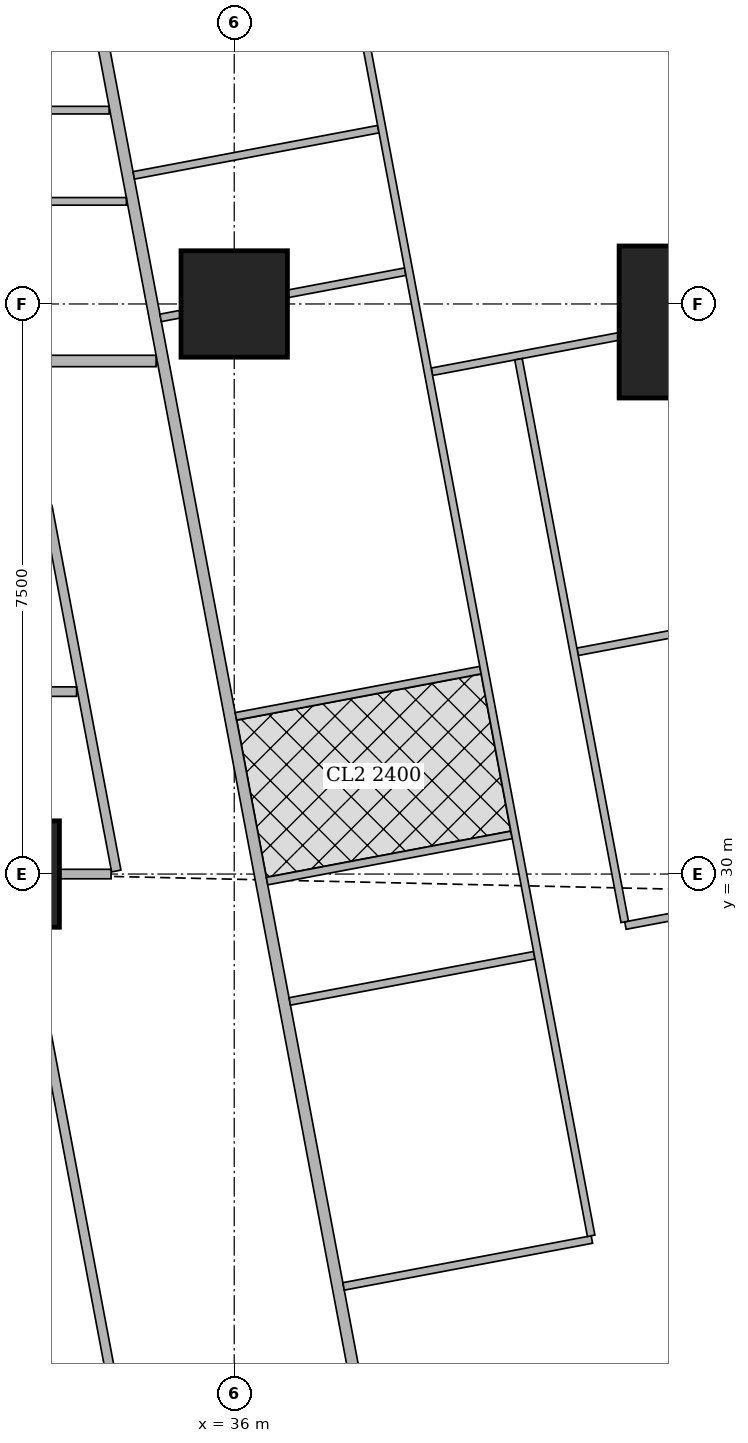
"""IFC4 building model, lengths in metres.
Left out: names, types, materials, properties, quantities, classifications, styles, units other than length and angle.
Written with IfcOpenShell. Run it as: python <this file> out.ifc"""

import sys

from ifc_helpers import new_model, si_unit, direction, frame, frame_2d, origin, origin_2d, place, context, subcontext, project, spatial, rectangle, extrude, element, fill, save


model = new_model("IFC4")
c1 = context("Model", 3, precision=1e-05, world=origin(), true_north=direction((0.0, 1.0)))
c2 = subcontext(c1, "Body", "Model", "MODEL_VIEW")
j1 = project(units=[si_unit("LENGTHUNIT", "METRE"), si_unit("PLANEANGLEUNIT", "RADIAN")], contexts=[c1])
p1 = place(None, origin())
s1 = spatial("IfcSite", under=j1, at=p1, CompositionType="ELEMENT")
p2 = place(p1, origin())
s2 = spatial("IfcBuilding", under=s1, at=p2, CompositionType="ELEMENT")
p3 = place(p2, frame((0.0, 0.0, 285.35)))
s3 = spatial("IfcBuildingStorey", under=s2, at=p3, CompositionType="ELEMENT", Elevation=285.35)
for number, where, z_axis, x_axis in (
    (1, (33.0, 30.0, 0.0), (0.0, 0.0, 1.0), (1.0, 0.0, 0.0)),
    (2, (36.0, 37.5, 0.0), (0.0, 0.0, 1.0), (1.0, 0.0, 0.0)),
):
    element("IfcColumn", number, at=place(p3, frame(where, z_axis=z_axis, x_axis=x_axis)), inside=s3, PredefinedType="COLUMN", context=c2, shape_type="SweptSolid", body=[
        extrude(rectangle(XDim=1.4, YDim=1.4, at=origin_2d()), origin(), (0.0, 0.0, 1.0), 3.75),
    ])
p4 = place(p3, frame((42.064, 37.263, 0.0), z_axis=(0.0, 0.0, 1.0), x_axis=(1.0, 0.0, 0.0)))
e3 = element("IfcColumn", 3, at=p4, inside=s3, PredefinedType="COLUMN", context=c2, shape_type="SweptSolid", body=[
    extrude(rectangle(XDim=2.0, YDim=2.0, at=origin_2d()), origin(), (0.0, 0.0, 1.0), 3.75),
])
p5 = place(p3, frame((29.501, 36.75, 0.0), z_axis=(0.0, 0.0, 1.0), x_axis=(1.0, 0.0, 0.0)))
e4 = element("IfcWall", 4, at=p5, inside=s3, PredefinedType="SOLIDWALL", context=c2, shape_type="SweptSolid", body=[
    extrude(rectangle(XDim=5.471, YDim=0.15, at=frame_2d((2.735, 0.0))), origin(), (0.0, 0.0, 1.0), 3.5),
])
p6 = place(p3, frame((34.036, 42.186, 0.0), z_axis=(0.0, 0.0, 1.0), x_axis=(0.185593518645, -0.9826266055, 0.0)))
e5 = element("IfcWall", 5, at=p6, inside=s3, PredefinedType="SOLIDWALL", context=c2, shape_type="SweptSolid", body=[
    extrude(rectangle(XDim=35.961, YDim=0.15, at=frame_2d((17.98, 0.0))), origin(), (0.0, 0.0, 1.0), 2.5),
])
p7 = place(p6, frame((19.345, 0.0, 0.0)))
e6 = element("IfcOpeningElement", 6, at=p7, cuts=e5, PredefinedType="OPENING", context=c2, shape_type="SweptSolid", body=[
    extrude(rectangle(XDim=1.0, YDim=2.1, at=frame_2d((0.5, 1.05))), frame((0.0, 0.085, 0.0), z_axis=(0.0, -1.0, 0.0), x_axis=(1.0, 0.0, 0.0)), (0.0, 0.0, 1.0), 0.17),
])
p8 = place(p6, frame((33.774, 0.0, 0.0)))
e7 = element("IfcOpeningElement", 7, at=p8, cuts=e5, PredefinedType="OPENING", context=c2, shape_type="SweptSolid", body=[
    extrude(rectangle(XDim=1.0, YDim=2.1, at=frame_2d((0.5, 1.05))), frame((0.0, 0.085, 0.0), z_axis=(0.0, -1.0, 0.0), x_axis=(1.0, 0.0, 0.0)), (0.0, 0.0, 1.0), 0.17),
])
p9 = place(p3, frame((41.054, 37.072, 0.0), z_axis=(0.0, 0.0, 1.0), x_axis=(-0.982579896219, -0.185840650951, 0.0)))
e8 = element("IfcWall", 8, at=p9, inside=s3, PredefinedType="PARTITIONING", context=c2, shape_type="SweptSolid", body=[
    extrude(rectangle(XDim=2.497, YDim=0.1, at=frame_2d((1.249, 0.0))), origin(), (0.0, 0.0, 1.0), 3.5),
])
p10 = place(p9, frame((1.447, 0.0, 0.0)))
e9 = element("IfcOpeningElement", 9, at=p10, cuts=e8, PredefinedType="OPENING", context=c2, shape_type="SweptSolid", body=[
    extrude(rectangle(XDim=0.9, YDim=2.1, at=frame_2d((0.45, 1.05))), frame((0.0, 0.06, 0.0), z_axis=(0.0, -1.0, 0.0), x_axis=(1.0, 0.0, 0.0)), (0.0, 0.0, 1.0), 0.12),
])
p11 = place(p3, frame((44.693, 33.713, 0.0), z_axis=(0.0, 0.0, 1.0), x_axis=(-0.982623519589, -0.185609856287, 0.0)))
e10 = element("IfcWall", 10, at=p11, inside=s3, PredefinedType="PARTITIONING", context=c2, shape_type="SweptSolid", body=[
    extrude(rectangle(XDim=4.25, YDim=0.1, at=frame_2d((2.125, 0.0))), origin(), (0.0, 0.0, 1.0), 2.5),
])
p12 = place(p3, frame((42.47, 29.572, 0.0), z_axis=(0.0, 0.0, 1.0), x_axis=(-0.982610503289, -0.185678751683, 0.0)))
e11 = element("IfcWall", 11, at=p12, inside=s3, PredefinedType="PARTITIONING", context=c2, shape_type="SweptSolid", body=[
    extrude(rectangle(XDim=1.346, YDim=0.1, at=frame_2d((0.673, 0.0))), origin(), (0.0, 0.0, 1.0), 2.5),
])
p13 = place(p3, frame((37.896, 39.8, 0.0), z_axis=(0.0, 0.0, 1.0), x_axis=(-0.982607026909, -0.185697147715, 0.0)))
e12 = element("IfcWall", 12, at=p13, inside=s3, PredefinedType="PARTITIONING", context=c2, shape_type="SweptSolid", body=[
    extrude(rectangle(XDim=3.275, YDim=0.1, at=frame_2d((1.637, 0.0))), origin(), (0.0, 0.0, 1.0), 3.5),
])
p14 = place(p3, frame((38.25, 37.925, 0.0), z_axis=(0.0, 0.0, 1.0), x_axis=(-0.982610209589, -0.185680305934, 0.0)))
e13 = element("IfcWall", 13, at=p14, inside=s3, PredefinedType="PARTITIONING", context=c2, shape_type="SweptSolid", body=[
    extrude(rectangle(XDim=1.567, YDim=0.1, at=frame_2d((0.784, 0.0))), origin(), (0.0, 0.0, 1.0), 3.5),
])
p15 = place(p3, frame((35.29, 37.366, 0.0), z_axis=(0.0, 0.0, 1.0), x_axis=(-0.982395465615, -0.18681313963, 0.0)))
e14 = element("IfcWall", 14, at=p15, inside=s3, PredefinedType="PARTITIONING", context=c2, shape_type="SweptSolid", body=[
    extrude(rectangle(XDim=0.263, YDim=0.1, at=frame_2d((0.131, 0.0))), origin(), (0.0, 0.0, 1.0), 3.5),
])
p16 = place(p3, frame((39.24, 32.683, 0.0), z_axis=(0.0, 0.0, 1.0), x_axis=(-0.982607026909, -0.185697147715, 0.0)))
e15 = element("IfcWall", 15, at=p16, inside=s3, PredefinedType="PARTITIONING", context=c2, shape_type="SweptSolid", body=[
    extrude(rectangle(XDim=3.275, YDim=0.1, at=frame_2d((1.637, 0.0))), origin(), (0.0, 0.0, 1.0), 3.5),
])
p17 = place(p3, frame((39.948, 28.932, 0.0), z_axis=(0.0, 0.0, 1.0), x_axis=(-0.982610347627, -0.185679575441, 0.0)))
e16 = element("IfcWall", 16, at=p17, inside=s3, PredefinedType="PARTITIONING", context=c2, shape_type="SweptSolid", body=[
    extrude(rectangle(XDim=3.274, YDim=0.1, at=frame_2d((1.637, 0.0))), origin(), (0.0, 0.0, 1.0), 3.5),
])
p18 = place(p3, frame((40.706, 25.192, 0.0), z_axis=(0.0, 0.0, 1.0), x_axis=(-0.982633623707, -0.185556356831, 0.0)))
e17 = element("IfcWall", 17, at=p18, inside=s3, PredefinedType="PARTITIONING", context=c2, shape_type="SweptSolid", body=[
    extrude(rectangle(XDim=3.325, YDim=0.1, at=frame_2d((1.663, 0.0))), origin(), (0.0, 0.0, 1.0), 3.5),
])
p19 = place(p3, frame((39.649, 30.515, 0.0), z_axis=(0.0, 0.0, 1.0), x_axis=(-0.982610347627, -0.185679575441, 0.0)))
e18 = element("IfcWall", 18, at=p19, inside=s3, PredefinedType="PARTITIONING", context=c2, shape_type="SweptSolid", body=[
    extrude(rectangle(XDim=3.274, YDim=0.1, at=frame_2d((1.637, 0.0))), origin(), (0.0, 0.0, 1.0), 2.5),
])
p20 = place(p3, frame((37.591, 41.685, 0.0), z_axis=(0.0, 0.0, 1.0), x_axis=(0.185541820726, -0.982636368532, 0.0)))
e19 = element("IfcWall", 19, at=p20, inside=s3, PredefinedType="PARTITIONING", context=c2, shape_type="SweptSolid", body=[
    extrude(rectangle(XDim=16.735, YDim=0.1, at=frame_2d((8.367, 0.0))), origin(), (0.0, 0.0, 1.0), 2.5),
])
p21 = place(p20, frame((2.413, 0.0, 0.0)))
e20 = element("IfcOpeningElement", 20, at=p21, cuts=e19, PredefinedType="OPENING", context=c2, shape_type="SweptSolid", body=[
    extrude(rectangle(XDim=0.9, YDim=2.1, at=frame_2d((0.45, 1.05))), frame((0.0, 0.06, 0.0), z_axis=(0.0, -1.0, 0.0), x_axis=(1.0, 0.0, 0.0)), (0.0, 0.0, 1.0), 0.12),
])
p22 = place(p20, frame((6.713, 0.0, 0.0)))
e21 = element("IfcOpeningElement", 21, at=p22, cuts=e19, PredefinedType="OPENING", context=c2, shape_type="SweptSolid", body=[
    extrude(rectangle(XDim=0.9, YDim=2.1, at=frame_2d((0.45, 1.05))), frame((0.0, 0.06, 0.0), z_axis=(0.0, -1.0, 0.0), x_axis=(1.0, 0.0, 0.0)), (0.0, 0.0, 1.0), 0.12),
])
p23 = place(p20, frame((9.805, 0.0, 0.0)))
e22 = element("IfcOpeningElement", 22, at=p23, cuts=e19, PredefinedType="OPENING", context=c2, shape_type="SweptSolid", body=[
    extrude(rectangle(XDim=0.9, YDim=2.1, at=frame_2d((0.45, 1.05))), frame((0.0, 0.06, 0.0), z_axis=(0.0, -1.0, 0.0), x_axis=(1.0, 0.0, 0.0)), (0.0, 0.0, 1.0), 0.12),
])
p24 = place(p20, frame((11.713, 0.0, 0.0)))
e23 = element("IfcOpeningElement", 23, at=p24, cuts=e19, PredefinedType="OPENING", context=c2, shape_type="SweptSolid", body=[
    extrude(rectangle(XDim=0.9, YDim=2.1, at=frame_2d((0.45, 1.05))), frame((0.0, 0.06, 0.0), z_axis=(0.0, -1.0, 0.0), x_axis=(1.0, 0.0, 0.0)), (0.0, 0.0, 1.0), 0.12),
])
p25 = place(p20, frame((14.426, 0.0, 0.0)))
e24 = element("IfcOpeningElement", 24, at=p25, cuts=e19, PredefinedType="OPENING", context=c2, shape_type="SweptSolid", body=[
    extrude(rectangle(XDim=0.9, YDim=2.1, at=frame_2d((0.45, 1.05))), frame((0.0, 0.06, 0.0), z_axis=(0.0, -1.0, 0.0), x_axis=(1.0, 0.0, 0.0)), (0.0, 0.0, 1.0), 0.12),
])
p26 = place(p3, frame((39.74, 36.773, 0.0), z_axis=(0.0, 0.0, 1.0), x_axis=(0.185583825641, -0.982628436216, 0.0)))
e25 = element("IfcWall", 25, at=p26, inside=s3, PredefinedType="PARTITIONING", context=c2, shape_type="SweptSolid", body=[
    extrude(rectangle(XDim=7.533, YDim=0.1, at=frame_2d((3.766, 0.0))), origin(), (0.0, 0.0, 1.0), 2.5),
])
p27 = place(p26, frame((2.726, 0.0, 0.0)))
e26 = element("IfcOpeningElement", 26, at=p27, cuts=e25, PredefinedType="OPENING", context=c2, shape_type="SweptSolid", body=[
    extrude(rectangle(XDim=0.9, YDim=2.1, at=frame_2d((0.45, 1.05))), frame((0.0, 0.06, 0.0), z_axis=(0.0, -1.0, 0.0), x_axis=(1.0, 0.0, 0.0)), (0.0, 0.0, 1.0), 0.12),
])
p28 = place(p26, frame((6.383, 0.0, 0.0)))
e27 = element("IfcOpeningElement", 27, at=p28, cuts=e25, PredefinedType="OPENING", context=c2, shape_type="SweptSolid", body=[
    extrude(rectangle(XDim=0.9, YDim=2.1, at=frame_2d((0.45, 1.05))), frame((0.0, 0.06, 0.0), z_axis=(0.0, -1.0, 0.0), x_axis=(1.0, 0.0, 0.0)), (0.0, 0.0, 1.0), 0.12),
])
p29 = place(p3, frame((28.8, 38.85, 0.0), z_axis=(0.0, 0.0, 1.0), x_axis=(1.0, 0.0, 0.0)))
e28 = element("IfcWall", 28, at=p29, inside=s3, PredefinedType="PARTITIONING", context=c2, shape_type="SweptSolid", body=[
    extrude(rectangle(XDim=5.781, YDim=0.1, at=frame_2d((2.891, 0.0))), origin(), (0.0, 0.0, 1.0), 3.5),
])
p30 = place(p29, frame((0.75, 0.0, 0.0)))
e29 = element("IfcOpeningElement", 29, at=p30, cuts=e28, PredefinedType="OPENING", context=c2, shape_type="SweptSolid", body=[
    extrude(rectangle(XDim=0.9, YDim=2.1, at=frame_2d((0.45, 1.05))), frame((0.0, 0.06, 0.0), z_axis=(0.0, -1.0, 0.0), x_axis=(1.0, 0.0, 0.0)), (0.0, 0.0, 1.0), 0.12),
])
p31 = place(p29, frame((2.5, 0.0, 0.0)))
e30 = element("IfcOpeningElement", 30, at=p31, cuts=e28, PredefinedType="OPENING", context=c2, shape_type="SweptSolid", body=[
    extrude(rectangle(XDim=0.9, YDim=2.1, at=frame_2d((0.45, 1.05))), frame((0.0, 0.06, 0.0), z_axis=(0.0, -1.0, 0.0), x_axis=(1.0, 0.0, 0.0)), (0.0, 0.0, 1.0), 0.12),
])
p32 = place(p29, frame((3.85, 0.0, 0.0)))
e31 = element("IfcOpeningElement", 31, at=p32, cuts=e28, PredefinedType="OPENING", context=c2, shape_type="SweptSolid", body=[
    extrude(rectangle(XDim=0.9, YDim=2.1, at=frame_2d((0.45, 1.05))), frame((0.0, 0.06, 0.0), z_axis=(0.0, -1.0, 0.0), x_axis=(1.0, 0.0, 0.0)), (0.0, 0.0, 1.0), 0.12),
])
p33 = place(p3, frame((28.8, 40.05, 0.0), z_axis=(0.0, 0.0, 1.0), x_axis=(1.0, 0.0, 0.0)))
e32 = element("IfcWall", 32, at=p33, inside=s3, PredefinedType="PARTITIONING", context=c2, shape_type="SweptSolid", body=[
    extrude(rectangle(XDim=5.554, YDim=0.1, at=frame_2d((2.777, 0.0))), origin(), (0.0, 0.0, 1.0), 3.5),
])
p34 = place(p33, frame((0.3, 0.0, 0.0)))
e33 = element("IfcOpeningElement", 33, at=p34, cuts=e32, PredefinedType="OPENING", context=c2, shape_type="SweptSolid", body=[
    extrude(rectangle(XDim=0.9, YDim=2.1, at=frame_2d((0.45, 1.05))), frame((0.0, 0.06, 0.0), z_axis=(0.0, -1.0, 0.0), x_axis=(1.0, 0.0, 0.0)), (0.0, 0.0, 1.0), 0.12),
])
p35 = place(p3, frame((34.448, 30.04, 0.0), z_axis=(0.0, 0.0, 1.0), x_axis=(-0.185749459238, 0.982597139418, 0.0)))
e34 = element("IfcWall", 34, at=p35, inside=s3, PredefinedType="PARTITIONING", context=c2, shape_type="SweptSolid", body=[
    extrude(rectangle(XDim=4.883, YDim=0.125, at=frame_2d((2.441, 0.0))), origin(), (0.0, 0.0, 1.0), 2.5),
])
p36 = place(p35, frame((0.95, 0.0, 0.0)))
e35 = element("IfcOpeningElement", 35, at=p36, cuts=e34, PredefinedType="OPENING", context=c2, shape_type="SweptSolid", body=[
    extrude(rectangle(XDim=1.0, YDim=2.1, at=frame_2d((0.5, 1.05))), frame((0.0, 0.073, 0.0), z_axis=(0.0, -1.0, 0.0), x_axis=(1.0, 0.0, 0.0)), (0.0, 0.0, 1.0), 0.145),
])
p37 = place(p35, frame((3.225, 0.0, 0.0)))
e36 = element("IfcOpeningElement", 36, at=p37, cuts=e34, PredefinedType="OPENING", context=c2, shape_type="SweptSolid", body=[
    extrude(rectangle(XDim=1.0, YDim=2.1, at=frame_2d((0.5, 1.05))), frame((0.0, 0.073, 0.0), z_axis=(0.0, -1.0, 0.0), x_axis=(1.0, 0.0, 0.0)), (0.0, 0.0, 1.0), 0.145),
])
p38 = place(p3, frame((35.83, 15.713, 0.0), z_axis=(0.0, 0.0, 1.0), x_axis=(-0.185534724166, 0.982637708481, 0.0)))
e37 = element("IfcWall", 37, at=p38, inside=s3, PredefinedType="PARTITIONING", context=c2, shape_type="SweptSolid", body=[
    extrude(rectangle(XDim=13.814, YDim=0.125, at=frame_2d((6.907, 0.0))), origin(), (0.0, 0.0, 1.0), 2.5),
])
p39 = place(p38, frame((5.35, 0.0, 0.0)))
e38 = element("IfcOpeningElement", 38, at=p39, cuts=e37, PredefinedType="OPENING", context=c2, shape_type="SweptSolid", body=[
    extrude(rectangle(XDim=1.0, YDim=2.1, at=frame_2d((0.5, 1.05))), frame((0.0, 0.073, 0.0), z_axis=(0.0, -1.0, 0.0), x_axis=(1.0, 0.0, 0.0)), (0.0, 0.0, 1.0), 0.145),
])
p40 = place(p3, frame((33.701, 30.0, 0.0), z_axis=(0.0, 0.0, 1.0), x_axis=(1.0, 0.0, 0.0)))
e39 = element("IfcWall", 39, at=p40, inside=s3, PredefinedType="PARTITIONING", context=c2, shape_type="SweptSolid", body=[
    extrude(rectangle(XDim=0.679, YDim=0.125, at=frame_2d((0.339, 0.0))), origin(), (0.0, 0.0, 1.0), 2.5),
])
p41 = place(p3, frame((28.95, 32.4, 0.0), z_axis=(0.0, 0.0, 1.0), x_axis=(1.0, 0.0, 0.0)))
e40 = element("IfcWall", 40, at=p41, inside=s3, PredefinedType="PARTITIONING", context=c2, shape_type="SweptSolid", body=[
    extrude(rectangle(XDim=4.976, YDim=0.125, at=frame_2d((2.488, 0.0))), origin(), (0.0, 0.0, 1.0), 3.5),
])
p42 = place(p10, origin())
e41 = element("IfcDoor", 41, at=p42, inside=s3, OperationType="SINGLE_SWING_LEFT", PredefinedType="DOOR", context=c2, shape_type="SweptSolid", body=[
    extrude(rectangle(XDim=0.9, YDim=2.1, at=frame_2d((0.45, 1.05))), frame((0.0, 0.025, 0.0), z_axis=(0.0, -1.0, 0.0), x_axis=(1.0, 0.0, 0.0)), (0.0, 0.0, 1.0), 0.05),
])
fill(e9, e41)
p43 = place(p21, origin())
e42 = element("IfcDoor", 42, at=p43, inside=s3, OperationType="SINGLE_SWING_LEFT", PredefinedType="DOOR", context=c2, shape_type="SweptSolid", body=[
    extrude(rectangle(XDim=0.9, YDim=2.1, at=frame_2d((0.45, 1.05))), frame((0.0, 0.025, 0.0), z_axis=(0.0, -1.0, 0.0), x_axis=(1.0, 0.0, 0.0)), (0.0, 0.0, 1.0), 0.05),
])
fill(e20, e42)
p44 = place(p22, origin())
e43 = element("IfcDoor", 43, at=p44, inside=s3, OperationType="SINGLE_SWING_LEFT", PredefinedType="DOOR", context=c2, shape_type="SweptSolid", body=[
    extrude(rectangle(XDim=0.9, YDim=2.1, at=frame_2d((0.45, 1.05))), frame((0.0, 0.025, 0.0), z_axis=(0.0, -1.0, 0.0), x_axis=(1.0, 0.0, 0.0)), (0.0, 0.0, 1.0), 0.05),
])
fill(e21, e43)
p45 = place(p23, origin())
e44 = element("IfcDoor", 44, at=p45, inside=s3, OperationType="SINGLE_SWING_LEFT", PredefinedType="DOOR", context=c2, shape_type="SweptSolid", body=[
    extrude(rectangle(XDim=0.9, YDim=2.1, at=frame_2d((0.45, 1.05))), frame((0.0, 0.025, 0.0), z_axis=(0.0, -1.0, 0.0), x_axis=(1.0, 0.0, 0.0)), (0.0, 0.0, 1.0), 0.05),
])
fill(e22, e44)
p46 = place(p24, origin())
e45 = element("IfcDoor", 45, at=p46, inside=s3, OperationType="SINGLE_SWING_RIGHT", PredefinedType="DOOR", context=c2, shape_type="SweptSolid", body=[
    extrude(rectangle(XDim=0.9, YDim=2.1, at=frame_2d((0.45, 1.05))), frame((0.0, 0.025, 0.0), z_axis=(0.0, -1.0, 0.0), x_axis=(1.0, 0.0, 0.0)), (0.0, 0.0, 1.0), 0.05),
])
fill(e23, e45)
p47 = place(p25, origin())
e46 = element("IfcDoor", 46, at=p47, inside=s3, OperationType="SINGLE_SWING_LEFT", PredefinedType="DOOR", context=c2, shape_type="SweptSolid", body=[
    extrude(rectangle(XDim=0.9, YDim=2.1, at=frame_2d((0.45, 1.05))), frame((0.0, 0.025, 0.0), z_axis=(0.0, -1.0, 0.0), x_axis=(1.0, 0.0, 0.0)), (0.0, 0.0, 1.0), 0.05),
])
fill(e24, e46)
p48 = place(p27, origin())
e47 = element("IfcDoor", 47, at=p48, inside=s3, OperationType="SINGLE_SWING_RIGHT", PredefinedType="DOOR", context=c2, shape_type="SweptSolid", body=[
    extrude(rectangle(XDim=0.9, YDim=2.1, at=frame_2d((0.45, 1.05))), frame((0.0, 0.025, 0.0), z_axis=(0.0, -1.0, 0.0), x_axis=(1.0, 0.0, 0.0)), (0.0, 0.0, 1.0), 0.05),
])
fill(e26, e47)
p49 = place(p28, origin())
e48 = element("IfcDoor", 48, at=p49, inside=s3, OperationType="SINGLE_SWING_RIGHT", PredefinedType="DOOR", context=c2, shape_type="SweptSolid", body=[
    extrude(rectangle(XDim=0.9, YDim=2.1, at=frame_2d((0.45, 1.05))), frame((0.0, 0.025, 0.0), z_axis=(0.0, -1.0, 0.0), x_axis=(1.0, 0.0, 0.0)), (0.0, 0.0, 1.0), 0.05),
])
fill(e27, e48)
p50 = place(p36, origin())
e49 = element("IfcDoor", 49, at=p50, inside=s3, OperationType="SINGLE_SWING_RIGHT", PredefinedType="DOOR", context=c2, shape_type="SweptSolid", body=[
    extrude(rectangle(XDim=1.0, YDim=2.1, at=frame_2d((0.5, 1.05))), frame((0.0, 0.025, 0.0), z_axis=(0.0, -1.0, 0.0), x_axis=(1.0, 0.0, 0.0)), (0.0, 0.0, 1.0), 0.05),
])
fill(e35, e49)
p51 = place(p37, origin())
e50 = element("IfcDoor", 50, at=p51, inside=s3, OperationType="SINGLE_SWING_RIGHT", PredefinedType="DOOR", context=c2, shape_type="SweptSolid", body=[
    extrude(rectangle(XDim=1.0, YDim=2.1, at=frame_2d((0.5, 1.05))), frame((0.0, 0.025, 0.0), z_axis=(0.0, -1.0, 0.0), x_axis=(1.0, 0.0, 0.0)), (0.0, 0.0, 1.0), 0.05),
])
fill(e36, e50)
save(model, sys.argv[1])
